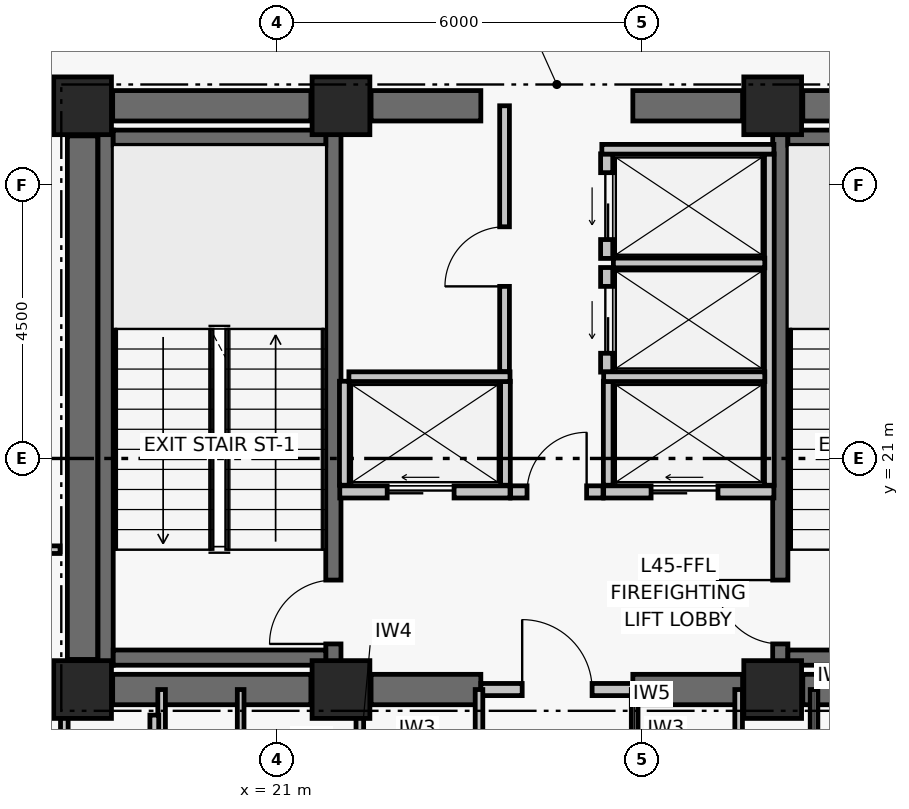
"""IFC4 building model, lengths in metres.
Left out: names, types, materials, properties, quantities, classifications, styles, units other than length and angle.
Written with IfcOpenShell. Run it as: python <this file> out.ifc"""

import sys

from ifc_helpers import new_model, si_unit, direction, frame, frame_2d, origin, origin_2d, place, context, subcontext, project, spatial, rectangle, extrude, element, fill, save


model = new_model("IFC4")
c1 = context("Model", 3, precision=1e-05, world=origin(), true_north=direction((0.0, 1.0)))
c2 = subcontext(c1, "Body", "Model", "MODEL_VIEW")
j1 = project(units=[si_unit("LENGTHUNIT", "METRE"), si_unit("PLANEANGLEUNIT", "RADIAN")], contexts=[c1])
p1 = place(None, origin())
s1 = spatial("IfcSite", under=j1, at=p1, CompositionType="ELEMENT")
p2 = place(p1, origin())
s2 = spatial("IfcBuilding", under=s1, at=p2, CompositionType="ELEMENT")
p3 = place(p2, frame((0.0, 0.0, 180.36)))
s3 = spatial("IfcBuildingStorey", under=s2, at=p3, CompositionType="ELEMENT", Elevation=180.36)
for number, where, z_axis, x_axis in (
    (1, (17.8, 17.2, 0.0), (0.0, 0.0, 1.0), (1.0, 0.0, 0.0)),
    (2, (22.05, 17.2, 0.0), (0.0, 0.0, 1.0), (1.0, 0.0, 0.0)),
    (3, (29.15, 17.2, 0.0), (0.0, 0.0, 1.0), (1.0, 0.0, 0.0)),
    (4, (17.8, 26.8, 0.0), (0.0, 0.0, 1.0), (1.0, 0.0, 0.0)),
    (5, (22.05, 26.8, 0.0), (0.0, 0.0, 1.0), (1.0, 0.0, 0.0)),
    (6, (29.15, 26.8, 0.0), (0.0, 0.0, 1.0), (1.0, 0.0, 0.0)),
):
    element("IfcColumn", number, at=place(p3, frame(where, z_axis=z_axis, x_axis=x_axis)), inside=s3, PredefinedType="COLUMN", context=c2, shape_type="SweptSolid", body=[
        extrude(rectangle(XDim=0.95, YDim=0.95, at=origin_2d()), origin(), (0.0, 0.0, 1.0), 3.72),
    ])
p4 = place(p3, frame((18.295, 17.2, 0.0), z_axis=(0.0, 0.0, 1.0), x_axis=(1.0, 0.0, 0.0)))
e7 = element("IfcWall", 7, at=p4, inside=s3, PredefinedType="SHEAR", context=c2, shape_type="SweptSolid", body=[
    extrude(rectangle(XDim=3.26, YDim=0.5, at=frame_2d((1.63, 0.0))), origin(), (0.0, 0.0, 1.0), 3.5),
])
p5 = place(p3, frame((22.545, 17.2, 0.0), z_axis=(0.0, 0.0, 1.0), x_axis=(1.0, 0.0, 0.0)))
e8 = element("IfcWall", 8, at=p5, inside=s3, PredefinedType="SHEAR", context=c2, shape_type="SweptSolid", body=[
    extrude(rectangle(XDim=1.805, YDim=0.5, at=frame_2d((0.903, 0.0))), origin(), (0.0, 0.0, 1.0), 3.5),
])
p6 = place(p3, frame((26.85, 17.2, 0.0), z_axis=(0.0, 0.0, 1.0), x_axis=(1.0, 0.0, 0.0)))
e9 = element("IfcWall", 9, at=p6, inside=s3, PredefinedType="SHEAR", context=c2, shape_type="SweptSolid", body=[
    extrude(rectangle(XDim=1.805, YDim=0.5, at=frame_2d((0.902, 0.0))), origin(), (0.0, 0.0, 1.0), 3.5),
])
for number, where, z_axis, x_axis in (
    (10, (29.645, 17.2, 0.0), (0.0, 0.0, 1.0), (1.0, 0.0, 0.0)),
    (11, (18.295, 26.8, 0.0), (0.0, 0.0, 1.0), (1.0, 0.0, 0.0)),
):
    element("IfcWall", number, at=place(p3, frame(where, z_axis=z_axis, x_axis=x_axis)), inside=s3, PredefinedType="SHEAR", context=c2, shape_type="SweptSolid", body=[
        extrude(rectangle(XDim=3.26, YDim=0.5, at=frame_2d((1.63, 0.0))), origin(), (0.0, 0.0, 1.0), 3.5),
    ])
p7 = place(p3, frame((22.545, 26.8, 0.0), z_axis=(0.0, 0.0, 1.0), x_axis=(1.0, 0.0, 0.0)))
e12 = element("IfcWall", 12, at=p7, inside=s3, PredefinedType="SHEAR", context=c2, shape_type="SweptSolid", body=[
    extrude(rectangle(XDim=1.805, YDim=0.5, at=frame_2d((0.903, 0.0))), origin(), (0.0, 0.0, 1.0), 3.5),
])
p8 = place(p3, frame((26.85, 26.8, 0.0), z_axis=(0.0, 0.0, 1.0), x_axis=(1.0, 0.0, 0.0)))
e13 = element("IfcWall", 13, at=p8, inside=s3, PredefinedType="SHEAR", context=c2, shape_type="SweptSolid", body=[
    extrude(rectangle(XDim=1.805, YDim=0.5, at=frame_2d((0.902, 0.0))), origin(), (0.0, 0.0, 1.0), 3.5),
])
p9 = place(p3, frame((29.645, 26.8, 0.0), z_axis=(0.0, 0.0, 1.0), x_axis=(1.0, 0.0, 0.0)))
e14 = element("IfcWall", 14, at=p9, inside=s3, PredefinedType="SHEAR", context=c2, shape_type="SweptSolid", body=[
    extrude(rectangle(XDim=3.26, YDim=0.5, at=frame_2d((1.63, 0.0))), origin(), (0.0, 0.0, 1.0), 3.5),
])
p10 = place(p3, frame((17.8, 17.695, 0.0), z_axis=(0.0, 0.0, 1.0), x_axis=(0.0, 1.0, 0.0)))
e15 = element("IfcWall", 15, at=p10, inside=s3, PredefinedType="SHEAR", context=c2, shape_type="SweptSolid", body=[
    extrude(rectangle(XDim=8.61, YDim=0.5, at=frame_2d((4.305, 0.0))), origin(), (0.0, 0.0, 1.0), 3.5),
])
p11 = place(p3, frame((18.179, 17.6, 0.0), z_axis=(0.0, 0.0, 1.0), x_axis=(0.0, 1.0, 0.0)))
e16 = element("IfcWall", 16, at=p11, inside=s3, PredefinedType="SHEAR", context=c2, shape_type="SweptSolid", body=[
    extrude(rectangle(XDim=8.8, YDim=0.25, at=frame_2d((4.4, 0.0))), origin(), (0.0, 0.0, 1.0), 3.5),
])
p12 = place(p3, frame((21.925, 17.6, 0.0), z_axis=(0.0, 0.0, 1.0), x_axis=(0.0, 1.0, 0.0)))
e17 = element("IfcWall", 17, at=p12, inside=s3, PredefinedType="SHEAR", context=c2, shape_type="SweptSolid", body=[
    extrude(rectangle(XDim=8.8, YDim=0.25, at=frame_2d((4.4, 0.0))), origin(), (0.0, 0.0, 1.0), 3.5),
])
p13 = place(p12, frame((0.35, 0.0, 0.0)))
e18 = element("IfcOpeningElement", 18, at=p13, cuts=e17, PredefinedType="OPENING", context=c2, shape_type="SweptSolid", body=[
    extrude(rectangle(XDim=1.05, YDim=2.08, at=frame_2d((0.525, 1.04))), frame((0.0, 0.135, 0.0), z_axis=(0.0, -1.0, 0.0), x_axis=(1.0, 0.0, 0.0)), (0.0, 0.0, 1.0), 0.27),
])
for number, where, z_axis, x_axis in (
    (19, (18.304, 17.725, 0.0), (0.0, 0.0, 1.0), (1.0, 0.0, 0.0)),
    (20, (18.304, 26.275, 0.0), (0.0, 0.0, 1.0), (1.0, 0.0, 0.0)),
):
    element("IfcWall", number, at=place(p3, frame(where, z_axis=z_axis, x_axis=x_axis)), inside=s3, PredefinedType="SHEAR", context=c2, shape_type="SweptSolid", body=[
        extrude(rectangle(XDim=3.496, YDim=0.25, at=frame_2d((1.748, 0.0))), origin(), (0.0, 0.0, 1.0), 3.5),
    ])
p14 = place(p3, frame((29.275, 17.6, 0.0), z_axis=(0.0, 0.0, 1.0), x_axis=(0.0, 1.0, 0.0)))
e21 = element("IfcWall", 21, at=p14, inside=s3, PredefinedType="SHEAR", context=c2, shape_type="SweptSolid", body=[
    extrude(rectangle(XDim=8.8, YDim=0.25, at=frame_2d((4.4, 0.0))), origin(), (0.0, 0.0, 1.0), 3.5),
])
p15 = place(p14, frame((0.35, 0.0, 0.0)))
e22 = element("IfcOpeningElement", 22, at=p15, cuts=e21, PredefinedType="OPENING", context=c2, shape_type="SweptSolid", body=[
    extrude(rectangle(XDim=1.05, YDim=2.08, at=frame_2d((0.525, 1.04))), frame((0.0, 0.135, 0.0), z_axis=(0.0, -1.0, 0.0), x_axis=(1.0, 0.0, 0.0)), (0.0, 0.0, 1.0), 0.27),
])
for number, where, z_axis, x_axis in (
    (23, (29.4, 17.725, 0.0), (0.0, 0.0, 1.0), (1.0, 0.0, 0.0)),
    (24, (29.4, 26.275, 0.0), (0.0, 0.0, 1.0), (1.0, 0.0, 0.0)),
):
    element("IfcWall", number, at=place(p3, frame(where, z_axis=z_axis, x_axis=x_axis)), inside=s3, PredefinedType="SHEAR", context=c2, shape_type="SweptSolid", body=[
        extrude(rectangle(XDim=3.496, YDim=0.25, at=frame_2d((1.748, 0.0))), origin(), (0.0, 0.0, 1.0), 3.5),
    ])
p16 = place(p3, frame((24.35, 17.2, 0.0), z_axis=(0.0, 0.0, 1.0), x_axis=(1.0, 0.0, 0.0)))
e25 = element("IfcWall", 25, at=p16, inside=s3, PredefinedType="PARTITIONING", context=c2, shape_type="SweptSolid", body=[
    extrude(rectangle(XDim=2.5, YDim=0.2, at=frame_2d((1.25, 0.0))), origin(), (0.0, 0.0, 1.0), 2.63),
])
p17 = place(p16, frame((0.68, 0.0, 0.0)))
e26 = element("IfcOpeningElement", 26, at=p17, cuts=e25, PredefinedType="OPENING", context=c2, shape_type="SweptSolid", body=[
    extrude(rectangle(XDim=1.15, YDim=2.08, at=frame_2d((0.575, 1.04))), frame((0.0, 0.11, 0.0), z_axis=(0.0, -1.0, 0.0), x_axis=(1.0, 0.0, 0.0)), (0.0, 0.0, 1.0), 0.22),
])
p18 = place(p3, frame((24.84, 20.45, 0.0), z_axis=(0.0, 0.0, 1.0), x_axis=(1.0, 0.0, 0.0)))
e27 = element("IfcWall", 27, at=p18, inside=s3, PredefinedType="PARTITIONING", context=c2, shape_type="SweptSolid", body=[
    extrude(rectangle(XDim=1.52, YDim=0.2, at=frame_2d((0.76, 0.0))), origin(), (0.0, 0.0, 1.0), 3.5),
])
p19 = place(p18, frame((0.27, 0.0, 0.0)))
e28 = element("IfcOpeningElement", 28, at=p19, cuts=e27, PredefinedType="OPENING", context=c2, shape_type="SweptSolid", body=[
    extrude(rectangle(XDim=0.98, YDim=2.06, at=frame_2d((0.49, 1.03))), frame((0.0, 0.11, 0.0), z_axis=(0.0, -1.0, 0.0), x_axis=(1.0, 0.0, 0.0)), (0.0, 0.0, 1.0), 0.22),
])
p20 = place(p3, frame((22.03, 20.45, 0.0), z_axis=(0.0, 0.0, 1.0), x_axis=(1.0, 0.0, 0.0)))
e29 = element("IfcWall", 29, at=p20, inside=s3, PredefinedType="PARTITIONING", context=c2, shape_type="SweptSolid", body=[
    extrude(rectangle(XDim=2.8, YDim=0.2, at=frame_2d((1.4, 0.0))), origin(), (0.0, 0.0, 1.0), 3.5),
])
p21 = place(p20, frame((0.78, 0.0, 0.0)))
e30 = element("IfcOpeningElement", 30, at=p21, cuts=e29, PredefinedType="OPENING", context=c2, shape_type="SweptSolid", body=[
    extrude(rectangle(XDim=1.1, YDim=2.08, at=frame_2d((0.55, 1.04))), frame((0.0, 0.11, 0.0), z_axis=(0.0, -1.0, 0.0), x_axis=(1.0, 0.0, 0.0)), (0.0, 0.0, 1.0), 0.22),
])
p22 = place(p3, frame((26.37, 20.45, 0.0), z_axis=(0.0, 0.0, 1.0), x_axis=(1.0, 0.0, 0.0)))
e31 = element("IfcWall", 31, at=p22, inside=s3, PredefinedType="PARTITIONING", context=c2, shape_type="SweptSolid", body=[
    extrude(rectangle(XDim=2.8, YDim=0.2, at=frame_2d((1.4, 0.0))), origin(), (0.0, 0.0, 1.0), 3.5),
])
p23 = place(p22, frame((0.78, 0.0, 0.0)))
e32 = element("IfcOpeningElement", 32, at=p23, cuts=e31, PredefinedType="OPENING", context=c2, shape_type="SweptSolid", body=[
    extrude(rectangle(XDim=1.1, YDim=2.08, at=frame_2d((0.55, 1.04))), frame((0.0, 0.11, 0.0), z_axis=(0.0, -1.0, 0.0), x_axis=(1.0, 0.0, 0.0)), (0.0, 0.0, 1.0), 0.22),
])
p24 = place(p3, frame((26.42, 22.42, 0.0), z_axis=(0.0, 0.0, 1.0), x_axis=(0.0, 1.0, 0.0)))
e33 = element("IfcWall", 33, at=p24, inside=s3, PredefinedType="PARTITIONING", context=c2, shape_type="SweptSolid", body=[
    extrude(rectangle(XDim=1.72, YDim=0.2, at=frame_2d((0.86, 0.0))), origin(), (0.0, 0.0, 1.0), 3.5),
])
p25 = place(p24, frame((0.31, 0.0, 0.0)))
e34 = element("IfcOpeningElement", 34, at=p25, cuts=e33, PredefinedType="OPENING", context=c2, shape_type="SweptSolid", body=[
    extrude(rectangle(XDim=1.1, YDim=2.08, at=frame_2d((0.55, 1.04))), frame((0.0, 0.11, 0.0), z_axis=(0.0, -1.0, 0.0), x_axis=(1.0, 0.0, 0.0)), (0.0, 0.0, 1.0), 0.22),
])
p26 = place(p3, frame((26.42, 24.29, 0.0), z_axis=(0.0, 0.0, 1.0), x_axis=(0.0, 1.0, 0.0)))
e35 = element("IfcWall", 35, at=p26, inside=s3, PredefinedType="PARTITIONING", context=c2, shape_type="SweptSolid", body=[
    extrude(rectangle(XDim=1.72, YDim=0.2, at=frame_2d((0.86, 0.0))), origin(), (0.0, 0.0, 1.0), 3.5),
])
p27 = place(p26, frame((0.31, 0.0, 0.0)))
e36 = element("IfcOpeningElement", 36, at=p27, cuts=e35, PredefinedType="OPENING", context=c2, shape_type="SweptSolid", body=[
    extrude(rectangle(XDim=1.1, YDim=2.08, at=frame_2d((0.55, 1.04))), frame((0.0, 0.11, 0.0), z_axis=(0.0, -1.0, 0.0), x_axis=(1.0, 0.0, 0.0)), (0.0, 0.0, 1.0), 0.22),
])
for number, where, z_axis, x_axis in (
    (37, (22.105, 20.56, 0.0), (0.0, 0.0, 1.0), (0.0, 1.0, 0.0)),
    (38, (24.755, 20.56, 0.0), (0.0, 0.0, 1.0), (0.0, 1.0, 0.0)),
):
    element("IfcWall", number, at=place(p3, frame(where, z_axis=z_axis, x_axis=x_axis)), inside=s3, PredefinedType="PARTITIONING", context=c2, shape_type="SweptSolid", body=[
        extrude(rectangle(XDim=1.71, YDim=0.16, at=frame_2d((0.855, 0.0))), origin(), (0.0, 0.0, 1.0), 3.5),
    ])
p28 = place(p3, frame((22.18, 22.345, 0.0), z_axis=(0.0, 0.0, 1.0), x_axis=(1.0, 0.0, 0.0)))
e39 = element("IfcWall", 39, at=p28, inside=s3, PredefinedType="PARTITIONING", context=c2, shape_type="SweptSolid", body=[
    extrude(rectangle(XDim=2.65, YDim=0.16, at=frame_2d((1.325, 0.0))), origin(), (0.0, 0.0, 1.0), 3.5),
])
p29 = place(p3, frame((29.095, 20.56, 0.0), z_axis=(0.0, 0.0, 1.0), x_axis=(0.0, 1.0, 0.0)))
e40 = element("IfcWall", 40, at=p29, inside=s3, PredefinedType="PARTITIONING", context=c2, shape_type="SweptSolid", body=[
    extrude(rectangle(XDim=5.45, YDim=0.16, at=frame_2d((2.725, 0.0))), origin(), (0.0, 0.0, 1.0), 3.5),
])
p30 = place(p3, frame((26.445, 20.56, 0.0), z_axis=(0.0, 0.0, 1.0), x_axis=(0.0, 1.0, 0.0)))
e41 = element("IfcWall", 41, at=p30, inside=s3, PredefinedType="PARTITIONING", context=c2, shape_type="SweptSolid", body=[
    extrude(rectangle(XDim=1.71, YDim=0.16, at=frame_2d((0.855, 0.0))), origin(), (0.0, 0.0, 1.0), 3.5),
])
p31 = place(p3, frame((26.37, 22.345, 0.0), z_axis=(0.0, 0.0, 1.0), x_axis=(1.0, 0.0, 0.0)))
e42 = element("IfcWall", 42, at=p31, inside=s3, PredefinedType="PARTITIONING", context=c2, shape_type="SweptSolid", body=[
    extrude(rectangle(XDim=2.65, YDim=0.16, at=frame_2d((1.325, 0.0))), origin(), (0.0, 0.0, 1.0), 3.5),
])
p32 = place(p3, frame((26.53, 24.215, 0.0), z_axis=(0.0, 0.0, 1.0), x_axis=(1.0, 0.0, 0.0)))
e43 = element("IfcWall", 43, at=p32, inside=s3, PredefinedType="PARTITIONING", context=c2, shape_type="SweptSolid", body=[
    extrude(rectangle(XDim=2.49, YDim=0.16, at=frame_2d((1.245, 0.0))), origin(), (0.0, 0.0, 1.0), 3.5),
])
p33 = place(p3, frame((26.34, 26.085, 0.0), z_axis=(0.0, 0.0, 1.0), x_axis=(1.0, 0.0, 0.0)))
e44 = element("IfcWall", 44, at=p33, inside=s3, PredefinedType="PARTITIONING", context=c2, shape_type="SweptSolid", body=[
    extrude(rectangle(XDim=2.83, YDim=0.16, at=frame_2d((1.415, 0.0))), origin(), (0.0, 0.0, 1.0), 3.5),
])
p34 = place(p3, frame((24.74, 22.43, 0.0), z_axis=(0.0, 0.0, 1.0), x_axis=(0.0, 1.0, 0.0)))
e45 = element("IfcWall", 45, at=p34, inside=s3, PredefinedType="PARTITIONING", context=c2, shape_type="SweptSolid", body=[
    extrude(rectangle(XDim=4.37, YDim=0.16, at=frame_2d((2.185, 0.0))), origin(), (0.0, 0.0, 1.0), 2.63),
])
p35 = place(p34, frame((1.4, 0.0, 0.0)))
e46 = element("IfcOpeningElement", 46, at=p35, cuts=e45, PredefinedType="OPENING", context=c2, shape_type="SweptSolid", body=[
    extrude(rectangle(XDim=0.98, YDim=2.06, at=frame_2d((0.49, 1.03))), frame((0.0, 0.09, 0.0), z_axis=(0.0, -1.0, 0.0), x_axis=(1.0, 0.0, 0.0)), (0.0, 0.0, 1.0), 0.18),
])
p36 = place(p3, frame((19.1, 14.95, 0.0), z_axis=(0.0, 0.0, 1.0), x_axis=(0.0, 1.0, 0.0)))
e47 = element("IfcWall", 47, at=p36, inside=s3, PredefinedType="PARTITIONING", context=c2, shape_type="SweptSolid", body=[
    extrude(rectangle(XDim=2.25, YDim=0.125, at=frame_2d((1.125, 0.0))), origin(), (0.0, 0.0, 1.0), 2.63),
])
p37 = place(p3, frame((20.4, 14.95, 0.0), z_axis=(0.0, 0.0, 1.0), x_axis=(0.0, 1.0, 0.0)))
e48 = element("IfcWall", 48, at=p37, inside=s3, PredefinedType="PARTITIONING", context=c2, shape_type="SweptSolid", body=[
    extrude(rectangle(XDim=2.25, YDim=0.11, at=frame_2d((1.125, 0.0))), origin(), (0.0, 0.0, 1.0), 2.63),
])
for number, where, z_axis, x_axis in (
    (49, (22.36, 14.95, 0.0), (0.0, 0.0, 1.0), (0.0, 1.0, 0.0)),
    (50, (24.32, 14.95, 0.0), (0.0, 0.0, 1.0), (0.0, 1.0, 0.0)),
):
    element("IfcWall", number, at=place(p3, frame(where, z_axis=z_axis, x_axis=x_axis)), inside=s3, PredefinedType="PARTITIONING", context=c2, shape_type="SweptSolid", body=[
        extrude(rectangle(XDim=2.25, YDim=0.125, at=frame_2d((1.125, 0.0))), origin(), (0.0, 0.0, 1.0), 2.63),
    ])
p38 = place(p3, frame((26.88, 14.95, 0.0), z_axis=(0.0, 0.0, 1.0), x_axis=(0.0, 1.0, 0.0)))
e51 = element("IfcWall", 51, at=p38, inside=s3, PredefinedType="PARTITIONING", context=c2, shape_type="SweptSolid", body=[
    extrude(rectangle(XDim=2.25, YDim=0.11, at=frame_2d((1.125, 0.0))), origin(), (0.0, 0.0, 1.0), 2.63),
])
for number, where, z_axis, x_axis in (
    (52, (28.59, 14.95, 0.0), (0.0, 0.0, 1.0), (0.0, 1.0, 0.0)),
    (53, (29.83, 14.95, 0.0), (0.0, 0.0, 1.0), (0.0, 1.0, 0.0)),
):
    element("IfcWall", number, at=place(p3, frame(where, z_axis=z_axis, x_axis=x_axis)), inside=s3, PredefinedType="PARTITIONING", context=c2, shape_type="SweptSolid", body=[
        extrude(rectangle(XDim=2.25, YDim=0.125, at=frame_2d((1.125, 0.0))), origin(), (0.0, 0.0, 1.0), 2.63),
    ])
p39 = place(p3, frame((18.98, 16.78, 0.0), z_axis=(0.0, 0.0, 1.0), x_axis=(0.0, -1.0, 0.0)))
e54 = element("IfcWall", 54, at=p39, inside=s3, PredefinedType="PARTITIONING", context=c2, shape_type="SweptSolid", body=[
    extrude(rectangle(XDim=1.85, YDim=0.145, at=frame_2d((0.925, 0.0))), origin(), (0.0, 0.0, 1.0), 2.63),
])
p40 = place(p3, frame((17.5, 8.986, 0.0), z_axis=(0.0, 0.0, 1.0), x_axis=(0.0, 1.0, 0.0)))
e55 = element("IfcWall", 55, at=p40, inside=s3, PredefinedType="PARTITIONING", context=c2, shape_type="SweptSolid", body=[
    extrude(rectangle(XDim=7.844, YDim=0.125, at=frame_2d((3.922, 0.0))), origin(), (0.0, 0.0, 1.0), 2.73),
])
p41 = place(p40, frame((4.257, 0.0, 0.0)))
e56 = element("IfcOpeningElement", 56, at=p41, cuts=e55, PredefinedType="OPENING", context=c2, shape_type="SweptSolid", body=[
    extrude(rectangle(XDim=0.92, YDim=2.05, at=frame_2d((0.46, 1.025))), frame((0.0, 0.073, 0.0), z_axis=(0.0, -1.0, 0.0), x_axis=(1.0, 0.0, 0.0)), (0.0, 0.0, 1.0), 0.145),
])
p42 = place(p3, frame((9.115, 19.5, 0.0), z_axis=(0.0, 0.0, 1.0), x_axis=(1.0, 0.0, 0.0)))
e57 = element("IfcWall", 57, at=p42, inside=s3, PredefinedType="PARTITIONING", context=c2, shape_type="SweptSolid", body=[
    extrude(rectangle(XDim=8.315, YDim=0.125, at=frame_2d((4.158, 0.0))), origin(), (0.0, 0.0, 1.0), 2.63),
])
p43 = place(p42, frame((1.135, 0.0, 0.0)))
e58 = element("IfcOpeningElement", 58, at=p43, cuts=e57, PredefinedType="OPENING", context=c2, shape_type="SweptSolid", body=[
    extrude(rectangle(XDim=0.92, YDim=2.05, at=frame_2d((0.46, 1.025))), frame((0.0, 0.073, 0.0), z_axis=(0.0, -1.0, 0.0), x_axis=(1.0, 0.0, 0.0)), (0.0, 0.0, 1.0), 0.145),
])
p44 = place(p3, frame((10.501, 27.0, 0.0), z_axis=(0.0, 0.0, 1.0), x_axis=(1.0, 0.0, 0.0)))
e59 = element("IfcWall", 59, at=p44, inside=s3, PredefinedType="PARTITIONING", context=c2, shape_type="SweptSolid", body=[
    extrude(rectangle(XDim=6.929, YDim=0.095, at=frame_2d((3.465, 0.0))), origin(), (0.0, 0.0, 1.0), 2.73),
])
p45 = place(p13, origin())
e60 = element("IfcDoor", 60, at=p45, inside=s3, OperationType="SINGLE_SWING_LEFT", PredefinedType="DOOR", context=c2, shape_type="SweptSolid", body=[
    extrude(rectangle(XDim=1.05, YDim=2.08, at=frame_2d((0.525, 1.04))), frame((0.0, 0.025, 0.0), z_axis=(0.0, -1.0, 0.0), x_axis=(1.0, 0.0, 0.0)), (0.0, 0.0, 1.0), 0.05),
])
fill(e18, e60)
p46 = place(p15, origin())
e61 = element("IfcDoor", 61, at=p46, inside=s3, OperationType="SINGLE_SWING_RIGHT", PredefinedType="DOOR", context=c2, shape_type="SweptSolid", body=[
    extrude(rectangle(XDim=1.05, YDim=2.08, at=frame_2d((0.525, 1.04))), frame((0.0, 0.025, 0.0), z_axis=(0.0, -1.0, 0.0), x_axis=(1.0, 0.0, 0.0)), (0.0, 0.0, 1.0), 0.05),
])
fill(e22, e61)
p47 = place(p17, origin())
e62 = element("IfcDoor", 62, at=p47, inside=s3, OperationType="SINGLE_SWING_LEFT", PredefinedType="DOOR", context=c2, shape_type="SweptSolid", body=[
    extrude(rectangle(XDim=1.15, YDim=2.08, at=frame_2d((0.575, 1.04))), frame((0.0, 0.025, 0.0), z_axis=(0.0, -1.0, 0.0), x_axis=(1.0, 0.0, 0.0)), (0.0, 0.0, 1.0), 0.05),
])
fill(e26, e62)
p48 = place(p19, origin())
e63 = element("IfcDoor", 63, at=p48, inside=s3, OperationType="SINGLE_SWING_RIGHT", PredefinedType="DOOR", context=c2, shape_type="SweptSolid", body=[
    extrude(rectangle(XDim=0.98, YDim=2.06, at=frame_2d((0.49, 1.03))), frame((0.0, 0.025, 0.0), z_axis=(0.0, -1.0, 0.0), x_axis=(1.0, 0.0, 0.0)), (0.0, 0.0, 1.0), 0.05),
])
fill(e28, e63)
p49 = place(p21, origin())
e64 = element("IfcDoor", 64, at=p49, inside=s3, OperationType="DOUBLE_DOOR_SLIDING", PredefinedType="DOOR", context=c2, shape_type="SweptSolid", body=[
    extrude(rectangle(XDim=1.1, YDim=2.08, at=frame_2d((0.55, 1.04))), frame((0.0, 0.025, 0.0), z_axis=(0.0, -1.0, 0.0), x_axis=(1.0, 0.0, 0.0)), (0.0, 0.0, 1.0), 0.05),
])
fill(e30, e64)
p50 = place(p23, origin())
e65 = element("IfcDoor", 65, at=p50, inside=s3, OperationType="DOUBLE_DOOR_SLIDING", PredefinedType="DOOR", context=c2, shape_type="SweptSolid", body=[
    extrude(rectangle(XDim=1.1, YDim=2.08, at=frame_2d((0.55, 1.04))), frame((0.0, 0.025, 0.0), z_axis=(0.0, -1.0, 0.0), x_axis=(1.0, 0.0, 0.0)), (0.0, 0.0, 1.0), 0.05),
])
fill(e32, e65)
p51 = place(p25, origin())
e66 = element("IfcDoor", 66, at=p51, inside=s3, OperationType="DOUBLE_DOOR_SLIDING", PredefinedType="DOOR", context=c2, shape_type="SweptSolid", body=[
    extrude(rectangle(XDim=1.1, YDim=2.08, at=frame_2d((0.55, 1.04))), frame((0.0, 0.025, 0.0), z_axis=(0.0, -1.0, 0.0), x_axis=(1.0, 0.0, 0.0)), (0.0, 0.0, 1.0), 0.05),
])
fill(e34, e66)
p52 = place(p27, origin())
e67 = element("IfcDoor", 67, at=p52, inside=s3, OperationType="DOUBLE_DOOR_SLIDING", PredefinedType="DOOR", context=c2, shape_type="SweptSolid", body=[
    extrude(rectangle(XDim=1.1, YDim=2.08, at=frame_2d((0.55, 1.04))), frame((0.0, 0.025, 0.0), z_axis=(0.0, -1.0, 0.0), x_axis=(1.0, 0.0, 0.0)), (0.0, 0.0, 1.0), 0.05),
])
fill(e36, e67)
p53 = place(p35, origin())
e68 = element("IfcDoor", 68, at=p53, inside=s3, OperationType="SINGLE_SWING_LEFT", PredefinedType="DOOR", context=c2, shape_type="SweptSolid", body=[
    extrude(rectangle(XDim=0.98, YDim=2.06, at=frame_2d((0.49, 1.03))), frame((0.0, 0.025, 0.0), z_axis=(0.0, -1.0, 0.0), x_axis=(1.0, 0.0, 0.0)), (0.0, 0.0, 1.0), 0.05),
])
fill(e46, e68)
save(model, sys.argv[1])
